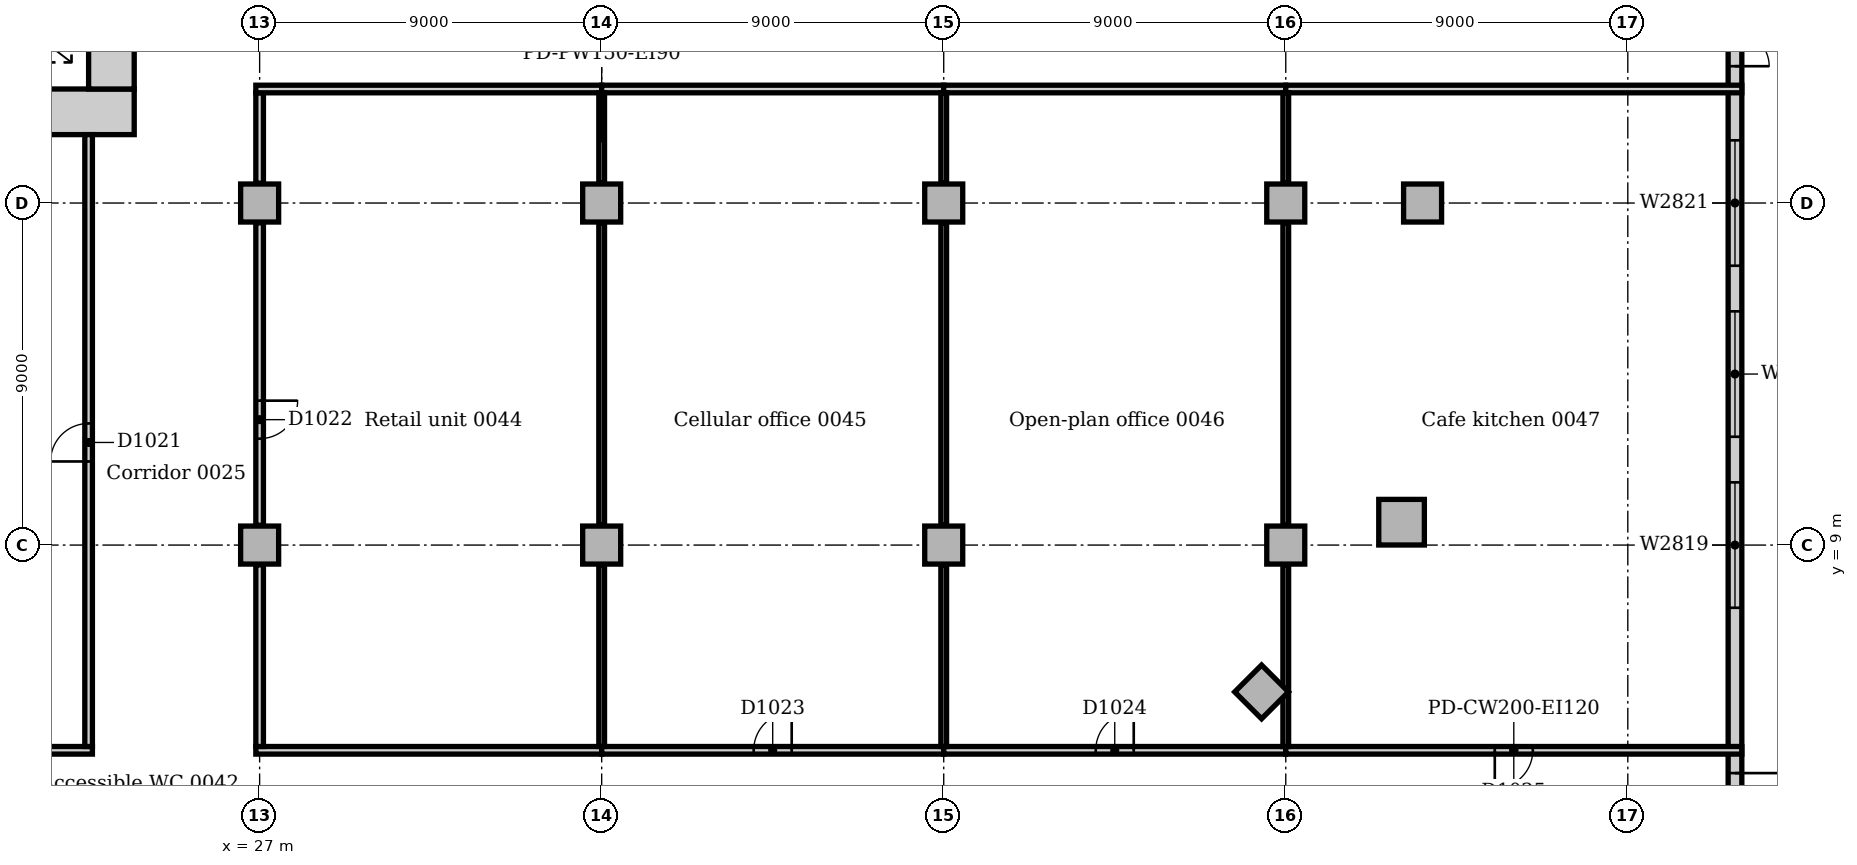
"""IFC4 building model, lengths in metres.
Left out: names, types, materials, properties, quantities, classifications, styles, units other than length and angle.
Written with IfcOpenShell. Run it as: python <this file> out.ifc"""

import sys

from ifc_helpers import new_model, si_unit, direction, frame, frame_2d, origin, origin_2d, place, context, subcontext, project, spatial, rectangle, extrude, element, fill, save


model = new_model("IFC4")
c1 = context("Model", 3, precision=1e-05, world=origin(), true_north=direction((0.0, 1.0)))
c2 = subcontext(c1, "Body", "Model", "MODEL_VIEW")
j1 = project(units=[si_unit("LENGTHUNIT", "METRE"), si_unit("PLANEANGLEUNIT", "RADIAN")], contexts=[c1])
p1 = place(None, origin())
s1 = spatial("IfcSite", under=j1, at=p1, CompositionType="ELEMENT")
p2 = place(p1, origin())
s2 = spatial("IfcBuilding", under=s1, at=p2, CompositionType="ELEMENT")
p3 = place(p2, origin())
s3 = spatial("IfcBuildingStorey", under=s2, at=p3, CompositionType="ELEMENT", Elevation=0.0)
p4 = place(p3, frame((3.9, 20.4, 0.0), z_axis=(0.0, 0.0, 1.0), x_axis=(1.0, 0.0, 0.0)))
e1 = element("IfcWall", 1, at=p4, inside=s3, PredefinedType="SOLIDWALL", context=c2, shape_type="SweptSolid", body=[
    extrude(rectangle(XDim=19.8, YDim=1.2, at=frame_2d((9.9, 0.0))), origin(), (0.0, 0.0, 1.0), 6.0),
])
p5 = place(p3, frame((23.1, 21.0, 0.0), z_axis=(0.0, 0.0, 1.0), x_axis=(0.0, 1.0, 0.0)))
e2 = element("IfcWall", 2, at=p5, inside=s3, PredefinedType="SOLIDWALL", context=c2, shape_type="SweptSolid", body=[
    extrude(rectangle(XDim=10.5, YDim=1.2, at=frame_2d((5.25, 0.0))), origin(), (0.0, 0.0, 1.0), 6.0),
])
p6 = place(p5, frame((4.35, 0.0, 0.0)))
e3 = element("IfcOpeningElement", 3, at=p6, cuts=e2, PredefinedType="OPENING", context=c2, shape_type="SweptSolid", body=[
    extrude(rectangle(XDim=1.8, YDim=2.1, at=frame_2d((0.9, 1.05))), frame((0.0, 0.61, 0.0), z_axis=(0.0, -1.0, 0.0), x_axis=(1.0, 0.0, 0.0)), (0.0, 0.0, 1.0), 1.22),
])
p7 = place(p3, frame((57.047, 9.602, 0.0), z_axis=(0.0, 0.0, 1.0), x_axis=(1.0, 0.0, 0.0)))
e4 = element("IfcColumn", 4, at=p7, inside=s3, PredefinedType="COLUMN", context=c2, shape_type="SweptSolid", body=[
    extrude(rectangle(XDim=1.2, YDim=1.2, at=origin_2d()), origin(), (0.0, 0.0, 1.0), 5.7),
])
for number, where, z_axis, x_axis in (
    (5, (53.364, 5.136, 0.0), (0.0, 0.0, 1.0), (0.707, 0.707, 0.0)),
    (6, (57.6, 18.0, 0.0), (0.0, 0.0, 1.0), (1.0, 0.0, 0.0)),
    (7, (27.0, 9.0, 0.0), (0.0, 0.0, 1.0), (1.0, 0.0, 0.0)),
    (8, (27.0, 18.0, 0.0), (0.0, 0.0, 1.0), (1.0, 0.0, 0.0)),
    (9, (36.0, 9.0, 0.0), (0.0, 0.0, 1.0), (1.0, 0.0, 0.0)),
    (10, (36.0, 18.0, 0.0), (0.0, 0.0, 1.0), (1.0, 0.0, 0.0)),
    (11, (45.0, 9.0, 0.0), (0.0, 0.0, 1.0), (1.0, 0.0, 0.0)),
    (12, (45.0, 18.0, 0.0), (0.0, 0.0, 1.0), (1.0, 0.0, 0.0)),
    (13, (54.0, 9.0, 0.0), (0.0, 0.0, 1.0), (1.0, 0.0, 0.0)),
    (14, (54.0, 18.0, 0.0), (0.0, 0.0, 1.0), (1.0, 0.0, 0.0)),
):
    element("IfcColumn", number, at=place(p3, frame(where, z_axis=z_axis, x_axis=x_axis)), inside=s3, PredefinedType="COLUMN", context=c2, shape_type="SweptSolid", body=[
        extrude(rectangle(XDim=1.0, YDim=1.0, at=origin_2d()), origin(), (0.0, 0.0, 1.0), 5.7),
    ])
p8 = place(p3, frame((65.82, -9.0, 0.0), z_axis=(0.0, 0.0, 1.0), x_axis=(0.0, 1.0, 0.0)))
e15 = element("IfcWall", 15, at=p8, inside=s3, PredefinedType="STANDARD", context=c2, shape_type="SweptSolid", body=[
    extrude(rectangle(XDim=63.0, YDim=0.36, at=frame_2d((31.5, 0.0))), origin(), (0.0, 0.0, 1.0), 5.7),
])
p9 = place(p8, frame((30.6, 0.0, 0.0)))
e16 = element("IfcOpeningElement", 16, at=p9, cuts=e15, PredefinedType="OPENING", context=c2, shape_type="SweptSolid", body=[
    extrude(rectangle(XDim=1.8, YDim=2.2, at=frame_2d((0.9, 1.1))), frame((0.0, 0.19, 0.0), z_axis=(0.0, -1.0, 0.0), x_axis=(1.0, 0.0, 0.0)), (0.0, 0.0, 1.0), 0.38),
])
p10 = place(p8, frame((51.6, 0.0, 0.0)))
e17 = element("IfcOpeningElement", 17, at=p10, cuts=e15, PredefinedType="OPENING", context=c2, shape_type="SweptSolid", body=[
    extrude(rectangle(XDim=1.8, YDim=2.2, at=frame_2d((0.9, 1.1))), frame((0.0, 0.19, 0.0), z_axis=(0.0, -1.0, 0.0), x_axis=(1.0, 0.0, 0.0)), (0.0, 0.0, 1.0), 0.38),
])
p11 = place(p8, frame((9.6, 0.0, 0.0)))
e18 = element("IfcOpeningElement", 18, at=p11, cuts=e15, PredefinedType="OPENING", context=c2, shape_type="SweptSolid", body=[
    extrude(rectangle(XDim=2.4, YDim=2.2, at=frame_2d((1.2, 1.1))), frame((0.0, 0.19, 0.0), z_axis=(0.0, -1.0, 0.0), x_axis=(1.0, 0.0, 0.0)), (0.0, 0.0, 1.0), 0.38),
])
p12 = place(p8, frame((2.85, 0.0, 0.6)))
e19 = element("IfcOpeningElement", 19, at=p12, cuts=e15, PredefinedType="OPENING", context=c2, shape_type="SweptSolid", body=[
    extrude(rectangle(XDim=3.3, YDim=3.0, at=frame_2d((1.65, 1.5))), frame((0.0, 0.19, 0.0), z_axis=(0.0, -1.0, 0.0), x_axis=(1.0, 0.0, 0.0)), (0.0, 0.0, 1.0), 0.38),
])
p13 = place(p8, frame((16.35, 0.0, 0.6)))
e20 = element("IfcOpeningElement", 20, at=p13, cuts=e15, PredefinedType="OPENING", context=c2, shape_type="SweptSolid", body=[
    extrude(rectangle(XDim=3.3, YDim=3.0, at=frame_2d((1.65, 1.5))), frame((0.0, 0.19, 0.0), z_axis=(0.0, -1.0, 0.0), x_axis=(1.0, 0.0, 0.0)), (0.0, 0.0, 1.0), 0.38),
])
p14 = place(p8, frame((20.85, 0.0, 0.6)))
e21 = element("IfcOpeningElement", 21, at=p14, cuts=e15, PredefinedType="OPENING", context=c2, shape_type="SweptSolid", body=[
    extrude(rectangle(XDim=3.3, YDim=3.0, at=frame_2d((1.65, 1.5))), frame((0.0, 0.19, 0.0), z_axis=(0.0, -1.0, 0.0), x_axis=(1.0, 0.0, 0.0)), (0.0, 0.0, 1.0), 0.38),
])
p15 = place(p8, frame((25.35, 0.0, 0.6)))
e22 = element("IfcOpeningElement", 22, at=p15, cuts=e15, PredefinedType="OPENING", context=c2, shape_type="SweptSolid", body=[
    extrude(rectangle(XDim=3.3, YDim=3.0, at=frame_2d((1.65, 1.5))), frame((0.0, 0.19, 0.0), z_axis=(0.0, -1.0, 0.0), x_axis=(1.0, 0.0, 0.0)), (0.0, 0.0, 1.0), 0.38),
])
p16 = place(p8, frame((34.35, 0.0, 0.6)))
e23 = element("IfcOpeningElement", 23, at=p16, cuts=e15, PredefinedType="OPENING", context=c2, shape_type="SweptSolid", body=[
    extrude(rectangle(XDim=3.3, YDim=3.0, at=frame_2d((1.65, 1.5))), frame((0.0, 0.19, 0.0), z_axis=(0.0, -1.0, 0.0), x_axis=(1.0, 0.0, 0.0)), (0.0, 0.0, 1.0), 0.38),
])
p17 = place(p8, frame((38.85, 0.0, 0.6)))
e24 = element("IfcOpeningElement", 24, at=p17, cuts=e15, PredefinedType="OPENING", context=c2, shape_type="SweptSolid", body=[
    extrude(rectangle(XDim=3.3, YDim=3.0, at=frame_2d((1.65, 1.5))), frame((0.0, 0.19, 0.0), z_axis=(0.0, -1.0, 0.0), x_axis=(1.0, 0.0, 0.0)), (0.0, 0.0, 1.0), 0.38),
])
p18 = place(p8, frame((43.35, 0.0, 0.6)))
e25 = element("IfcOpeningElement", 25, at=p18, cuts=e15, PredefinedType="OPENING", context=c2, shape_type="SweptSolid", body=[
    extrude(rectangle(XDim=3.3, YDim=3.0, at=frame_2d((1.65, 1.5))), frame((0.0, 0.19, 0.0), z_axis=(0.0, -1.0, 0.0), x_axis=(1.0, 0.0, 0.0)), (0.0, 0.0, 1.0), 0.38),
])
p19 = place(p8, frame((47.85, 0.0, 0.6)))
e26 = element("IfcOpeningElement", 26, at=p19, cuts=e15, PredefinedType="OPENING", context=c2, shape_type="SweptSolid", body=[
    extrude(rectangle(XDim=3.3, YDim=3.0, at=frame_2d((1.65, 1.5))), frame((0.0, 0.19, 0.0), z_axis=(0.0, -1.0, 0.0), x_axis=(1.0, 0.0, 0.0)), (0.0, 0.0, 1.0), 0.38),
])
p20 = place(p8, frame((56.85, 0.0, 0.6)))
e27 = element("IfcOpeningElement", 27, at=p20, cuts=e15, PredefinedType="OPENING", context=c2, shape_type="SweptSolid", body=[
    extrude(rectangle(XDim=3.3, YDim=3.0, at=frame_2d((1.65, 1.5))), frame((0.0, 0.19, 0.0), z_axis=(0.0, -1.0, 0.0), x_axis=(1.0, 0.0, 0.0)), (0.0, 0.0, 1.0), 0.38),
])
p21 = place(p3, frame((18.0, 3.6, 0.0), z_axis=(0.0, 0.0, 1.0), x_axis=(1.0, 0.0, 0.0)))
e28 = element("IfcWall", 28, at=p21, inside=s3, PredefinedType="PARTITIONING", context=c2, shape_type="SweptSolid", body=[
    extrude(rectangle(XDim=4.6, YDim=0.2, at=frame_2d((2.3, 0.0))), origin(), (0.0, 0.0, 1.0), 5.7),
])
p22 = place(p3, frame((26.9, 3.6, 0.0), z_axis=(0.0, 0.0, 1.0), x_axis=(1.0, 0.0, 0.0)))
e29 = element("IfcWall", 29, at=p22, inside=s3, PredefinedType="PARTITIONING", context=c2, shape_type="SweptSolid", body=[
    extrude(rectangle(XDim=9.1, YDim=0.2, at=frame_2d((4.55, 0.0))), origin(), (0.0, 0.0, 1.0), 5.7),
])
p23 = place(p3, frame((36.0, 3.6, 0.0), z_axis=(0.0, 0.0, 1.0), x_axis=(1.0, 0.0, 0.0)))
e30 = element("IfcWall", 30, at=p23, inside=s3, PredefinedType="PARTITIONING", context=c2, shape_type="SweptSolid", body=[
    extrude(rectangle(XDim=9.0, YDim=0.2, at=frame_2d((4.5, 0.0))), origin(), (0.0, 0.0, 1.0), 5.7),
])
p24 = place(p23, frame((4.0, 0.0, 0.0)))
e31 = element("IfcOpeningElement", 31, at=p24, cuts=e30, PredefinedType="OPENING", context=c2, shape_type="SweptSolid", body=[
    extrude(rectangle(XDim=1.0, YDim=2.1, at=frame_2d((0.5, 1.05))), frame((0.0, 0.11, 0.0), z_axis=(0.0, -1.0, 0.0), x_axis=(1.0, 0.0, 0.0)), (0.0, 0.0, 1.0), 0.22),
])
p25 = place(p3, frame((45.0, 3.6, 0.0), z_axis=(0.0, 0.0, 1.0), x_axis=(1.0, 0.0, 0.0)))
e32 = element("IfcWall", 32, at=p25, inside=s3, PredefinedType="PARTITIONING", context=c2, shape_type="SweptSolid", body=[
    extrude(rectangle(XDim=9.0, YDim=0.2, at=frame_2d((4.5, 0.0))), origin(), (0.0, 0.0, 1.0), 5.7),
])
p26 = place(p25, frame((4.0, 0.0, 0.0)))
e33 = element("IfcOpeningElement", 33, at=p26, cuts=e32, PredefinedType="OPENING", context=c2, shape_type="SweptSolid", body=[
    extrude(rectangle(XDim=1.0, YDim=2.1, at=frame_2d((0.5, 1.05))), frame((0.0, 0.11, 0.0), z_axis=(0.0, -1.0, 0.0), x_axis=(1.0, 0.0, 0.0)), (0.0, 0.0, 1.0), 0.22),
])
p27 = place(p3, frame((54.0, 3.6, 0.0), z_axis=(0.0, 0.0, 1.0), x_axis=(1.0, 0.0, 0.0)))
e34 = element("IfcWall", 34, at=p27, inside=s3, PredefinedType="PARTITIONING", context=c2, shape_type="SweptSolid", body=[
    extrude(rectangle(XDim=12.0, YDim=0.2, at=frame_2d((6.0, 0.0))), origin(), (0.0, 0.0, 1.0), 5.7),
])
p28 = place(p27, frame((5.5, 0.0, 0.0)))
e35 = element("IfcOpeningElement", 35, at=p28, cuts=e34, PredefinedType="OPENING", context=c2, shape_type="SweptSolid", body=[
    extrude(rectangle(XDim=1.0, YDim=2.1, at=frame_2d((0.5, 1.05))), frame((0.0, 0.11, 0.0), z_axis=(0.0, -1.0, 0.0), x_axis=(1.0, 0.0, 0.0)), (0.0, 0.0, 1.0), 0.22),
])
p29 = place(p3, frame((22.5, 3.7, 0.0), z_axis=(0.0, 0.0, 1.0), x_axis=(0.0, 1.0, 0.0)))
e36 = element("IfcWall", 36, at=p29, inside=s3, PredefinedType="PARTITIONING", context=c2, shape_type="SweptSolid", body=[
    extrude(rectangle(XDim=16.1, YDim=0.2, at=frame_2d((8.05, 0.0))), origin(), (0.0, 0.0, 1.0), 5.7),
])
p30 = place(p29, frame((7.5, 0.0, 0.0)))
e37 = element("IfcOpeningElement", 37, at=p30, cuts=e36, PredefinedType="OPENING", context=c2, shape_type="SweptSolid", body=[
    extrude(rectangle(XDim=1.0, YDim=2.1, at=frame_2d((0.5, 1.05))), frame((0.0, 0.11, 0.0), z_axis=(0.0, -1.0, 0.0), x_axis=(1.0, 0.0, 0.0)), (0.0, 0.0, 1.0), 0.22),
])
p31 = place(p3, frame((27.0, 3.7, 0.0), z_axis=(0.0, 0.0, 1.0), x_axis=(0.0, 1.0, 0.0)))
e38 = element("IfcWall", 38, at=p31, inside=s3, PredefinedType="PARTITIONING", context=c2, shape_type="SweptSolid", body=[
    extrude(rectangle(XDim=4.78, YDim=0.2, at=frame_2d((2.39, 0.0))), origin(), (0.0, 0.0, 1.0), 5.7),
])
p32 = place(p3, frame((27.0, 9.52, 0.0), z_axis=(0.0, 0.0, 1.0), x_axis=(0.0, 1.0, 0.0)))
e39 = element("IfcWall", 39, at=p32, inside=s3, PredefinedType="PARTITIONING", context=c2, shape_type="SweptSolid", body=[
    extrude(rectangle(XDim=7.96, YDim=0.2, at=frame_2d((3.98, 0.0))), origin(), (0.0, 0.0, 1.0), 5.7),
])
p33 = place(p32, frame((2.28, 0.0, 0.0)))
e40 = element("IfcOpeningElement", 40, at=p33, cuts=e39, PredefinedType="OPENING", context=c2, shape_type="SweptSolid", body=[
    extrude(rectangle(XDim=1.0, YDim=2.1, at=frame_2d((0.5, 1.05))), frame((0.0, 0.11, 0.0), z_axis=(0.0, -1.0, 0.0), x_axis=(1.0, 0.0, 0.0)), (0.0, 0.0, 1.0), 0.22),
])
p34 = place(p3, frame((27.0, 18.52, 0.0), z_axis=(0.0, 0.0, 1.0), x_axis=(0.0, 1.0, 0.0)))
e41 = element("IfcWall", 41, at=p34, inside=s3, PredefinedType="PARTITIONING", context=c2, shape_type="SweptSolid", body=[
    extrude(rectangle(XDim=2.38, YDim=0.2, at=frame_2d((1.19, 0.0))), origin(), (0.0, 0.0, 1.0), 5.7),
])
p35 = place(p3, frame((26.9, 21.0, 0.0), z_axis=(0.0, 0.0, 1.0), x_axis=(1.0, 0.0, 0.0)))
e42 = element("IfcWall", 42, at=p35, inside=s3, PredefinedType="PARTITIONING", context=c2, shape_type="SweptSolid", body=[
    extrude(rectangle(XDim=9.1, YDim=0.2, at=frame_2d((4.55, 0.0))), origin(), (0.0, 0.0, 1.0), 5.7),
])
for number, where, z_axis, x_axis in (
    (43, (36.0, 21.0, 0.0), (0.0, 0.0, 1.0), (1.0, 0.0, 0.0)),
    (44, (45.0, 21.0, 0.0), (0.0, 0.0, 1.0), (1.0, 0.0, 0.0)),
):
    element("IfcWall", number, at=place(p3, frame(where, z_axis=z_axis, x_axis=x_axis)), inside=s3, PredefinedType="PARTITIONING", context=c2, shape_type="SweptSolid", body=[
        extrude(rectangle(XDim=9.0, YDim=0.2, at=frame_2d((4.5, 0.0))), origin(), (0.0, 0.0, 1.0), 5.7),
    ])
p36 = place(p3, frame((54.0, 21.0, 0.0), z_axis=(0.0, 0.0, 1.0), x_axis=(1.0, 0.0, 0.0)))
e45 = element("IfcWall", 45, at=p36, inside=s3, PredefinedType="PARTITIONING", context=c2, shape_type="SweptSolid", body=[
    extrude(rectangle(XDim=12.0, YDim=0.2, at=frame_2d((6.0, 0.0))), origin(), (0.0, 0.0, 1.0), 5.7),
])
p37 = place(p3, frame((36.0, 3.7, 0.0), z_axis=(0.0, 0.0, 1.0), x_axis=(0.0, 1.0, 0.0)))
e46 = element("IfcWall", 46, at=p37, inside=s3, PredefinedType="PARTITIONING", context=c2, shape_type="SweptSolid", body=[
    extrude(rectangle(XDim=4.78, YDim=0.15, at=frame_2d((2.39, 0.0))), origin(), (0.0, 0.0, 1.0), 5.7),
])
p38 = place(p3, frame((36.0, 9.52, 0.0), z_axis=(0.0, 0.0, 1.0), x_axis=(0.0, 1.0, 0.0)))
e47 = element("IfcWall", 47, at=p38, inside=s3, PredefinedType="PARTITIONING", context=c2, shape_type="SweptSolid", body=[
    extrude(rectangle(XDim=7.96, YDim=0.15, at=frame_2d((3.98, 0.0))), origin(), (0.0, 0.0, 1.0), 5.7),
])
p39 = place(p3, frame((36.0, 18.52, 0.0), z_axis=(0.0, 0.0, 1.0), x_axis=(0.0, 1.0, 0.0)))
e48 = element("IfcWall", 48, at=p39, inside=s3, PredefinedType="PARTITIONING", context=c2, shape_type="SweptSolid", body=[
    extrude(rectangle(XDim=2.38, YDim=0.15, at=frame_2d((1.19, 0.0))), origin(), (0.0, 0.0, 1.0), 5.7),
])
p40 = place(p3, frame((45.0, 3.7, 0.0), z_axis=(0.0, 0.0, 1.0), x_axis=(0.0, 1.0, 0.0)))
e49 = element("IfcWall", 49, at=p40, inside=s3, PredefinedType="PARTITIONING", context=c2, shape_type="SweptSolid", body=[
    extrude(rectangle(XDim=4.78, YDim=0.15, at=frame_2d((2.39, 0.0))), origin(), (0.0, 0.0, 1.0), 5.7),
])
p41 = place(p3, frame((45.0, 9.52, 0.0), z_axis=(0.0, 0.0, 1.0), x_axis=(0.0, 1.0, 0.0)))
e50 = element("IfcWall", 50, at=p41, inside=s3, PredefinedType="PARTITIONING", context=c2, shape_type="SweptSolid", body=[
    extrude(rectangle(XDim=7.96, YDim=0.15, at=frame_2d((3.98, 0.0))), origin(), (0.0, 0.0, 1.0), 5.7),
])
p42 = place(p3, frame((45.0, 18.52, 0.0), z_axis=(0.0, 0.0, 1.0), x_axis=(0.0, 1.0, 0.0)))
e51 = element("IfcWall", 51, at=p42, inside=s3, PredefinedType="PARTITIONING", context=c2, shape_type="SweptSolid", body=[
    extrude(rectangle(XDim=2.38, YDim=0.15, at=frame_2d((1.19, 0.0))), origin(), (0.0, 0.0, 1.0), 5.7),
])
p43 = place(p3, frame((54.0, 3.7, 0.0), z_axis=(0.0, 0.0, 1.0), x_axis=(0.0, 1.0, 0.0)))
e52 = element("IfcWall", 52, at=p43, inside=s3, PredefinedType="PARTITIONING", context=c2, shape_type="SweptSolid", body=[
    extrude(rectangle(XDim=4.78, YDim=0.15, at=frame_2d((2.39, 0.0))), origin(), (0.0, 0.0, 1.0), 5.7),
])
p44 = place(p3, frame((54.0, 9.52, 0.0), z_axis=(0.0, 0.0, 1.0), x_axis=(0.0, 1.0, 0.0)))
e53 = element("IfcWall", 53, at=p44, inside=s3, PredefinedType="PARTITIONING", context=c2, shape_type="SweptSolid", body=[
    extrude(rectangle(XDim=7.96, YDim=0.15, at=frame_2d((3.98, 0.0))), origin(), (0.0, 0.0, 1.0), 5.7),
])
p45 = place(p3, frame((54.0, 18.52, 0.0), z_axis=(0.0, 0.0, 1.0), x_axis=(0.0, 1.0, 0.0)))
e54 = element("IfcWall", 54, at=p45, inside=s3, PredefinedType="PARTITIONING", context=c2, shape_type="SweptSolid", body=[
    extrude(rectangle(XDim=2.38, YDim=0.15, at=frame_2d((1.19, 0.0))), origin(), (0.0, 0.0, 1.0), 5.7),
])
p46 = place(p9, frame((1.8, 0.0, 0.0), z_axis=(0.0, 0.0, 1.0), x_axis=(-1.0, 0.0, 0.0)))
e55 = element("IfcDoor", 55, at=p46, inside=s3, OperationType="DOUBLE_DOOR_SINGLE_SWING", PredefinedType="DOOR", context=c2, shape_type="SweptSolid", body=[
    extrude(rectangle(XDim=1.8, YDim=2.2, at=frame_2d((0.9, 1.1))), frame((0.0, -0.07, 0.0), z_axis=(0.0, -1.0, 0.0), x_axis=(1.0, 0.0, 0.0)), (0.0, 0.0, 1.0), 0.05),
])
fill(e16, e55)
p47 = place(p11, frame((2.4, 0.0, 0.0), z_axis=(0.0, 0.0, 1.0), x_axis=(-1.0, 0.0, 0.0)))
e56 = element("IfcDoor", 56, at=p47, inside=s3, OperationType="DOUBLE_DOOR_SINGLE_SWING", PredefinedType="DOOR", context=c2, shape_type="SweptSolid", body=[
    extrude(rectangle(XDim=2.4, YDim=2.2, at=frame_2d((1.2, 1.1))), frame((0.0, -0.07, 0.0), z_axis=(0.0, -1.0, 0.0), x_axis=(1.0, 0.0, 0.0)), (0.0, 0.0, 1.0), 0.05),
])
fill(e18, e56)
p48 = place(p13, origin())
e57 = element("IfcWindow", 57, at=p48, inside=s3, PartitioningType="SINGLE_PANEL", PredefinedType="WINDOW", context=c2, shape_type="SweptSolid", body=[
    extrude(rectangle(XDim=3.3, YDim=3.0, at=frame_2d((1.65, 1.5))), frame((0.0, 0.13, 0.0), z_axis=(0.0, -1.0, 0.0), x_axis=(1.0, 0.0, 0.0)), (0.0, 0.0, 1.0), 0.06),
])
fill(e20, e57)
p49 = place(p14, origin())
e58 = element("IfcWindow", 58, at=p49, inside=s3, PartitioningType="SINGLE_PANEL", PredefinedType="WINDOW", context=c2, shape_type="SweptSolid", body=[
    extrude(rectangle(XDim=3.3, YDim=3.0, at=frame_2d((1.65, 1.5))), frame((0.0, 0.13, 0.0), z_axis=(0.0, -1.0, 0.0), x_axis=(1.0, 0.0, 0.0)), (0.0, 0.0, 1.0), 0.06),
])
fill(e21, e58)
p50 = place(p15, origin())
e59 = element("IfcWindow", 59, at=p50, inside=s3, PartitioningType="SINGLE_PANEL", PredefinedType="WINDOW", context=c2, shape_type="SweptSolid", body=[
    extrude(rectangle(XDim=3.3, YDim=3.0, at=frame_2d((1.65, 1.5))), frame((0.0, 0.13, 0.0), z_axis=(0.0, -1.0, 0.0), x_axis=(1.0, 0.0, 0.0)), (0.0, 0.0, 1.0), 0.06),
])
fill(e22, e59)
p51 = place(p30, origin())
e60 = element("IfcDoor", 60, at=p51, inside=s3, OperationType="SINGLE_SWING_LEFT", PredefinedType="DOOR", context=c2, shape_type="SweptSolid", body=[
    extrude(rectangle(XDim=1.0, YDim=2.1, at=frame_2d((0.5, 1.05))), frame((0.0, 0.025, 0.0), z_axis=(0.0, -1.0, 0.0), x_axis=(1.0, 0.0, 0.0)), (0.0, 0.0, 1.0), 0.05),
])
fill(e37, e60)
p52 = place(p33, frame((1.0, 0.0, 0.0), z_axis=(0.0, 0.0, 1.0), x_axis=(-1.0, 0.0, 0.0)))
e61 = element("IfcDoor", 61, at=p52, inside=s3, OperationType="SINGLE_SWING_LEFT", PredefinedType="DOOR", context=c2, shape_type="SweptSolid", body=[
    extrude(rectangle(XDim=1.0, YDim=2.1, at=frame_2d((0.5, 1.05))), frame((0.0, 0.025, 0.0), z_axis=(0.0, -1.0, 0.0), x_axis=(1.0, 0.0, 0.0)), (0.0, 0.0, 1.0), 0.05),
])
fill(e40, e61)
p53 = place(p24, origin())
e62 = element("IfcDoor", 62, at=p53, inside=s3, OperationType="SINGLE_SWING_RIGHT", PredefinedType="DOOR", context=c2, shape_type="SweptSolid", body=[
    extrude(rectangle(XDim=1.0, YDim=2.1, at=frame_2d((0.5, 1.05))), frame((0.0, 0.025, 0.0), z_axis=(0.0, -1.0, 0.0), x_axis=(1.0, 0.0, 0.0)), (0.0, 0.0, 1.0), 0.05),
])
fill(e31, e62)
p54 = place(p26, origin())
e63 = element("IfcDoor", 63, at=p54, inside=s3, OperationType="SINGLE_SWING_RIGHT", PredefinedType="DOOR", context=c2, shape_type="SweptSolid", body=[
    extrude(rectangle(XDim=1.0, YDim=2.1, at=frame_2d((0.5, 1.05))), frame((0.0, 0.025, 0.0), z_axis=(0.0, -1.0, 0.0), x_axis=(1.0, 0.0, 0.0)), (0.0, 0.0, 1.0), 0.05),
])
fill(e33, e63)
p55 = place(p28, frame((1.0, 0.0, 0.0), z_axis=(0.0, 0.0, 1.0), x_axis=(-1.0, 0.0, 0.0)))
e64 = element("IfcDoor", 64, at=p55, inside=s3, OperationType="SINGLE_SWING_RIGHT", PredefinedType="DOOR", context=c2, shape_type="SweptSolid", body=[
    extrude(rectangle(XDim=1.0, YDim=2.1, at=frame_2d((0.5, 1.05))), frame((0.0, 0.025, 0.0), z_axis=(0.0, -1.0, 0.0), x_axis=(1.0, 0.0, 0.0)), (0.0, 0.0, 1.0), 0.05),
])
fill(e35, e64)
save(model, sys.argv[1])
